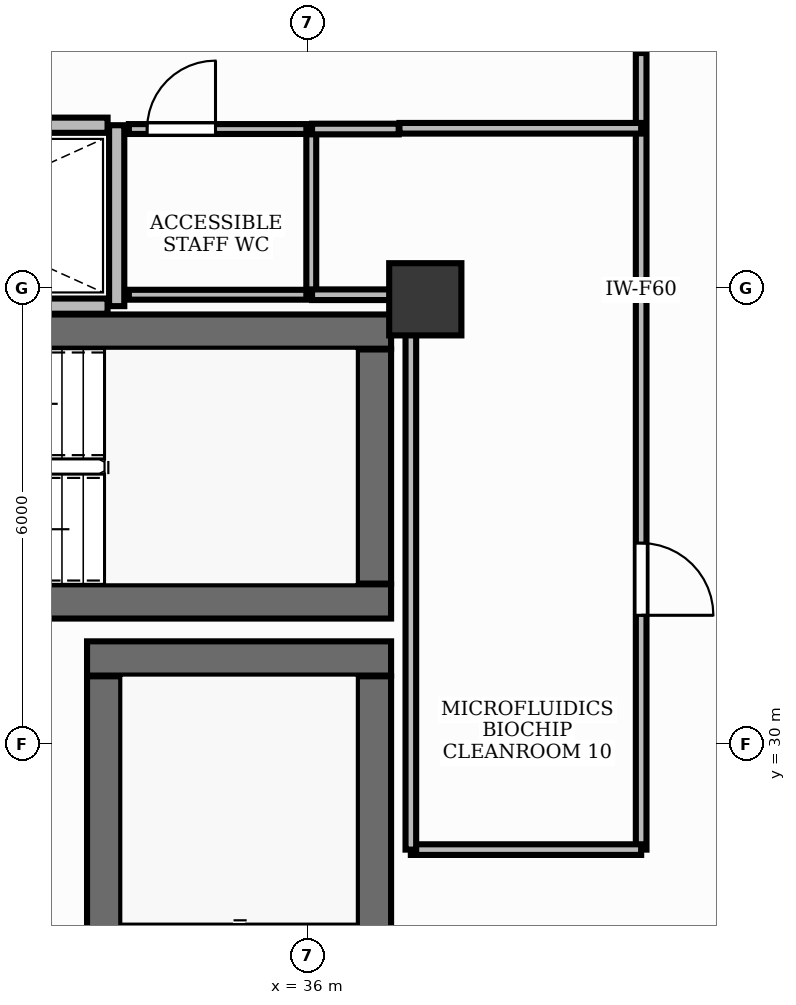
"""IFC4 building model, lengths in metres.
Left out: names, types, materials, properties, quantities, classifications, styles, units other than length and angle.
Written with IfcOpenShell. Run it as: python <this file> out.ifc"""

import sys

from ifc_helpers import new_model, si_unit, direction, frame, frame_2d, origin, origin_2d, place, context, subcontext, project, spatial, rectangle, extrude, element, fill, save


model = new_model("IFC4")
c1 = context("Model", 3, precision=1e-05, world=origin(), true_north=direction((0.0, 1.0)))
c2 = subcontext(c1, "Body", "Model", "MODEL_VIEW")
j1 = project(units=[si_unit("LENGTHUNIT", "METRE"), si_unit("PLANEANGLEUNIT", "RADIAN")], contexts=[c1])
p1 = place(None, origin())
s1 = spatial("IfcSite", under=j1, at=p1, CompositionType="ELEMENT")
p2 = place(p1, origin())
s2 = spatial("IfcBuilding", under=s1, at=p2, CompositionType="ELEMENT")
p3 = place(p2, frame((0.0, 0.0, 25.8)))
s3 = spatial("IfcBuildingStorey", under=s2, at=p3, CompositionType="ELEMENT", Elevation=25.8)
p4 = place(p3, frame((28.852, 35.425, 0.0), z_axis=(0.0, 0.0, 1.0), x_axis=(1.0, 0.0, 0.0)))
e1 = element("IfcWall", 1, at=p4, inside=s3, PredefinedType="SHEAR", context=c2, shape_type="SweptSolid", body=[
    extrude(rectangle(XDim=8.248, YDim=0.45, at=frame_2d((4.124, 0.0))), origin(), (0.0, 0.0, 1.0), 3.9),
])
p5 = place(p3, frame((28.35, 31.875, 0.0), z_axis=(0.0, 0.0, 1.0), x_axis=(1.0, 0.0, 0.0)))
e2 = element("IfcWall", 2, at=p5, inside=s3, PredefinedType="SHEAR", context=c2, shape_type="SweptSolid", body=[
    extrude(rectangle(XDim=8.75, YDim=0.45, at=frame_2d((4.375, 0.0))), origin(), (0.0, 0.0, 1.0), 3.9),
])
p6 = place(p3, frame((36.875, 32.11, 0.0), z_axis=(0.0, 0.0, 1.0), x_axis=(0.0, 1.0, 0.0)))
e3 = element("IfcWall", 3, at=p6, inside=s3, PredefinedType="SHEAR", context=c2, shape_type="SweptSolid", body=[
    extrude(rectangle(XDim=3.08, YDim=0.45, at=frame_2d((1.54, 0.0))), origin(), (0.0, 0.0, 1.0), 3.9),
])
p7 = place(p3, frame((33.1, 31.125, 0.0), z_axis=(0.0, 0.0, 1.0), x_axis=(1.0, 0.0, 0.0)))
e4 = element("IfcWall", 4, at=p7, inside=s3, PredefinedType="SHEAR", context=c2, shape_type="SweptSolid", body=[
    extrude(rectangle(XDim=4.0, YDim=0.45, at=frame_2d((2.0, 0.0))), origin(), (0.0, 0.0, 1.0), 3.9),
])
p8 = place(p3, frame((36.875, 23.11, 0.0), z_axis=(0.0, 0.0, 1.0), x_axis=(0.0, 1.0, 0.0)))
e5 = element("IfcWall", 5, at=p8, inside=s3, PredefinedType="SHEAR", context=c2, shape_type="SweptSolid", body=[
    extrude(rectangle(XDim=7.78, YDim=0.45, at=frame_2d((3.89, 0.0))), origin(), (0.0, 0.0, 1.0), 3.9),
])
p9 = place(p3, frame((33.325, 23.11, 0.0), z_axis=(0.0, 0.0, 1.0), x_axis=(0.0, 1.0, 0.0)))
e6 = element("IfcWall", 6, at=p9, inside=s3, PredefinedType="SHEAR", context=c2, shape_type="SweptSolid", body=[
    extrude(rectangle(XDim=7.78, YDim=0.45, at=frame_2d((3.89, 0.0))), origin(), (0.0, 0.0, 1.0), 3.9),
])
p10 = place(p9, frame((0.2, 0.0, 0.0)))
e7 = element("IfcOpeningElement", 7, at=p10, cuts=e6, PredefinedType="OPENING", context=c2, shape_type="SweptSolid", body=[
    extrude(rectangle(XDim=1.05, YDim=2.15, at=frame_2d((0.525, 1.075))), frame((0.0, 0.24, 0.0), z_axis=(0.0, -1.0, 0.0), x_axis=(1.0, 0.0, 0.0)), (0.0, 0.0, 1.0), 0.48),
])
p11 = place(p3, frame((37.55, 35.85, -0.0), z_axis=(0.0, 0.0, 1.0), x_axis=(1.0, 0.0, 0.0)))
e8 = element("IfcColumn", 8, at=p11, inside=s3, PredefinedType="PILASTER", context=c2, shape_type="SweptSolid", body=[
    extrude(rectangle(XDim=0.95, YDim=0.95, at=origin_2d()), origin(), (0.0, 0.0, 1.0), 3.901),
])
p12 = place(p3, frame((33.49, 35.76, 0.0), z_axis=(0.0, 0.0, 1.0), x_axis=(0.0, 1.0, 0.0)))
e9 = element("IfcWall", 9, at=p12, inside=s3, PredefinedType="PARTITIONING", context=c2, shape_type="SweptSolid", body=[
    extrude(rectangle(XDim=2.38, YDim=0.2, at=frame_2d((1.19, 0.0))), origin(), (0.0, 0.0, 1.0), 2.91),
])
for number, where, z_axis, x_axis in (
    (10, (28.8, 35.76, 0.0), (0.0, 0.0, 1.0), (1.0, 0.0, 0.0)),
    (11, (28.8, 38.14, 0.0), (0.0, 0.0, 1.0), (1.0, 0.0, 0.0)),
):
    element("IfcWall", number, at=place(p3, frame(where, z_axis=z_axis, x_axis=x_axis)), inside=s3, PredefinedType="PARTITIONING", context=c2, shape_type="SweptSolid", body=[
        extrude(rectangle(XDim=4.57, YDim=0.2, at=frame_2d((2.285, 0.0))), origin(), (0.0, 0.0, 1.0), 2.91),
    ])
p13 = place(p3, frame((33.65, 38.09, 0.0), z_axis=(0.0, 0.0, 1.0), x_axis=(1.0, 0.0, 0.0)))
e12 = element("IfcWall", 12, at=p13, inside=s3, PredefinedType="PARTITIONING", context=c2, shape_type="SweptSolid", body=[
    extrude(rectangle(XDim=2.4, YDim=0.13, at=frame_2d((1.2, 0.0))), origin(), (0.0, 0.0, 1.0), 2.91),
])
p14 = place(p13, frame((0.24, 0.0, 0.0)))
e13 = element("IfcOpeningElement", 13, at=p14, cuts=e12, PredefinedType="OPENING", context=c2, shape_type="SweptSolid", body=[
    extrude(rectangle(XDim=0.9, YDim=2.15, at=frame_2d((0.45, 1.075))), frame((0.0, 0.08, 0.0), z_axis=(0.0, -1.0, 0.0), x_axis=(1.0, 0.0, 0.0)), (0.0, 0.0, 1.0), 0.16),
])
p15 = place(p3, frame((40.39, 39.09, 0.0), z_axis=(0.0, 0.0, 1.0), x_axis=(0.0, -1.0, 0.0)))
e14 = element("IfcWall", 14, at=p15, inside=s3, PredefinedType="PARTITIONING", context=c2, shape_type="SweptSolid", body=[
    extrude(rectangle(XDim=10.48, YDim=0.14, at=frame_2d((5.24, 0.0))), origin(), (0.0, 0.0, 1.0), 2.91),
])
p16 = place(p15, frame((6.447, 0.0, 0.0)))
e15 = element("IfcOpeningElement", 15, at=p16, cuts=e14, PredefinedType="OPENING", context=c2, shape_type="SweptSolid", body=[
    extrude(rectangle(XDim=0.95, YDim=2.15, at=frame_2d((0.475, 1.075))), frame((0.0, 0.085, 0.0), z_axis=(0.0, -1.0, 0.0), x_axis=(1.0, 0.0, 0.0)), (0.0, 0.0, 1.0), 0.17),
])
p17 = place(p3, frame((36.05, 35.91, 0.0), z_axis=(0.0, 0.0, 1.0), x_axis=(-1.0, 0.0, 0.0)))
e16 = element("IfcWall", 16, at=p17, inside=s3, PredefinedType="PARTITIONING", context=c2, shape_type="SweptSolid", body=[
    extrude(rectangle(XDim=2.4, YDim=0.13, at=frame_2d((1.2, 0.0))), origin(), (0.0, 0.0, 1.0), 2.91),
])
p18 = place(p3, frame((36.05, 38.09, 0.0), z_axis=(0.0, 0.0, 1.0), x_axis=(0.0, -1.0, 0.0)))
e17 = element("IfcWall", 17, at=p18, inside=s3, PredefinedType="PARTITIONING", context=c2, shape_type="SweptSolid", body=[
    extrude(rectangle(XDim=2.18, YDim=0.13, at=frame_2d((1.09, 0.0))), origin(), (0.0, 0.0, 1.0), 2.91),
])
p19 = place(p3, frame((36.06, 38.09, 0.0), z_axis=(0.0, 0.0, 1.0), x_axis=(1.0, 0.0, 0.0)))
e18 = element("IfcWall", 18, at=p19, inside=s3, PredefinedType="PARTITIONING", context=c2, shape_type="SweptSolid", body=[
    extrude(rectangle(XDim=1.14, YDim=0.14, at=frame_2d((0.57, 0.0))), origin(), (0.0, 0.0, 1.0), 2.91),
])
p20 = place(p3, frame((37.21, 38.1, 0.0), z_axis=(0.0, 0.0, 1.0), x_axis=(1.0, 0.0, 0.0)))
e19 = element("IfcWall", 19, at=p20, inside=s3, PredefinedType="PARTITIONING", context=c2, shape_type="SweptSolid", body=[
    extrude(rectangle(XDim=3.18, YDim=0.14, at=frame_2d((1.59, 0.0))), origin(), (0.0, 0.0, 1.0), 2.91),
])
p21 = place(p3, frame((40.39, 28.61, 0.0), z_axis=(0.0, 0.0, 1.0), x_axis=(-1.0, 0.0, 0.0)))
e20 = element("IfcWall", 20, at=p21, inside=s3, PredefinedType="PARTITIONING", context=c2, shape_type="SweptSolid", body=[
    extrude(rectangle(XDim=3.03, YDim=0.14, at=frame_2d((1.515, 0.0))), origin(), (0.0, 0.0, 1.0), 2.91),
])
p22 = place(p3, frame((37.36, 28.61, 0.0), z_axis=(0.0, 0.0, 1.0), x_axis=(0.0, 1.0, 0.0)))
e21 = element("IfcWall", 21, at=p22, inside=s3, PredefinedType="PARTITIONING", context=c2, shape_type="SweptSolid", body=[
    extrude(rectangle(XDim=7.29, YDim=0.14, at=frame_2d((3.645, 0.0))), origin(), (0.0, 0.0, 1.0), 2.91),
])
p23 = place(p3, frame((37.35, 35.91, 0.0), z_axis=(0.0, 0.0, 1.0), x_axis=(-1.0, 0.0, 0.0)))
e22 = element("IfcWall", 22, at=p23, inside=s3, PredefinedType="PARTITIONING", context=c2, shape_type="SweptSolid", body=[
    extrude(rectangle(XDim=1.29, YDim=0.14, at=frame_2d((0.645, 0.0))), origin(), (0.0, 0.0, 1.0), 2.91),
])
p24 = place(p14, origin())
e23 = element("IfcDoor", 23, at=p24, inside=s3, OperationType="SINGLE_SWING_RIGHT", PredefinedType="DOOR", context=c2, shape_type="SweptSolid", body=[
    extrude(rectangle(XDim=0.9, YDim=2.15, at=frame_2d((0.45, 1.075))), frame((0.0, 0.025, 0.0), z_axis=(0.0, -1.0, 0.0), x_axis=(1.0, 0.0, 0.0)), (0.0, 0.0, 1.0), 0.05),
])
fill(e13, e23)
p25 = place(p16, origin())
e24 = element("IfcDoor", 24, at=p25, inside=s3, OperationType="SINGLE_SWING_RIGHT", PredefinedType="DOOR", context=c2, shape_type="SweptSolid", body=[
    extrude(rectangle(XDim=0.95, YDim=2.15, at=frame_2d((0.475, 1.075))), frame((0.0, 0.025, 0.0), z_axis=(0.0, -1.0, 0.0), x_axis=(1.0, 0.0, 0.0)), (0.0, 0.0, 1.0), 0.05),
])
fill(e15, e24)
save(model, sys.argv[1])
